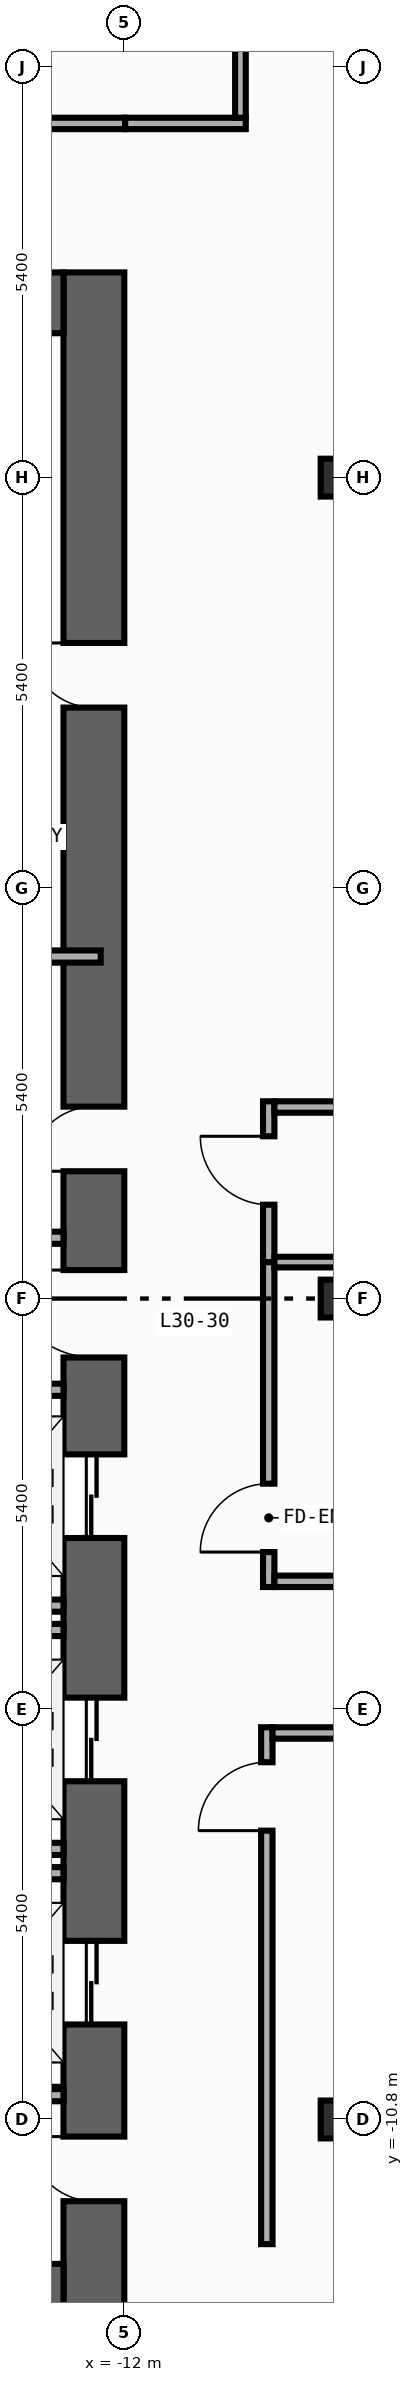
"""IFC4 building model, lengths in metres.
Left out: names, types, materials, properties, quantities, classifications, styles, units other than length and angle.
Written with IfcOpenShell. Run it as: python <this file> out.ifc"""

import sys

from ifc_helpers import new_model, si_unit, direction, frame, frame_2d, origin, origin_2d, place, context, subcontext, project, spatial, rectangle, i_section, extrude, element, fill, save


model = new_model("IFC4")
c1 = context("Model", 3, precision=1e-05, world=origin(), true_north=direction((0.0, 1.0)))
c2 = subcontext(c1, "Body", "Model", "MODEL_VIEW")
j1 = project(units=[si_unit("LENGTHUNIT", "METRE"), si_unit("PLANEANGLEUNIT", "RADIAN")], contexts=[c1])
p1 = place(None, origin())
s1 = spatial("IfcSite", under=j1, at=p1, CompositionType="ELEMENT")
p2 = place(p1, origin())
s2 = spatial("IfcBuilding", under=s1, at=p2, CompositionType="ELEMENT")
p3 = place(p2, frame((0.0, 0.0, 131.0)))
s3 = spatial("IfcBuildingStorey", under=s2, at=p3, CompositionType="ELEMENT", Elevation=131.0)
p4 = place(p3, frame((-12.4, -13.5, 0.0), z_axis=(0.0, 0.0, 1.0), x_axis=(0.0, 1.0, 0.0)))
e1 = element("IfcWall", 1, at=p4, inside=s3, PredefinedType="SHEAR", context=c2, shape_type="SweptSolid", body=[
    extrude(rectangle(XDim=27.0, YDim=0.8, at=frame_2d((13.5, 0.0))), origin(), (0.0, 0.0, 1.0), 3.94),
])
p5 = place(p4, frame((10.35, 0.0, 0.0)))
e2 = element("IfcOpeningElement", 2, at=p5, cuts=e1, PredefinedType="OPENING", context=c2, shape_type="SweptSolid", body=[
    extrude(rectangle(XDim=1.1, YDim=2.2, at=frame_2d((0.55, 1.1))), frame((0.0, 0.41, 0.0), z_axis=(0.0, -1.0, 0.0), x_axis=(1.0, 0.0, 0.0)), (0.0, 0.0, 1.0), 0.82),
])
p6 = place(p4, frame((7.15, 0.0, 0.0)))
e3 = element("IfcOpeningElement", 3, at=p6, cuts=e1, PredefinedType="OPENING", context=c2, shape_type="SweptSolid", body=[
    extrude(rectangle(XDim=1.1, YDim=2.2, at=frame_2d((0.55, 1.1))), frame((0.0, 0.41, 0.0), z_axis=(0.0, -1.0, 0.0), x_axis=(1.0, 0.0, 0.0)), (0.0, 0.0, 1.0), 0.82),
])
p7 = place(p4, frame((3.95, 0.0, 0.0)))
e4 = element("IfcOpeningElement", 4, at=p7, cuts=e1, PredefinedType="OPENING", context=c2, shape_type="SweptSolid", body=[
    extrude(rectangle(XDim=1.1, YDim=2.2, at=frame_2d((0.55, 1.1))), frame((0.0, 0.41, 0.0), z_axis=(0.0, -1.0, 0.0), x_axis=(1.0, 0.0, 0.0)), (0.0, 0.0, 1.0), 0.82),
])
p8 = place(p4, frame((15.175, 0.0, 0.0)))
e5 = element("IfcOpeningElement", 5, at=p8, cuts=e1, PredefinedType="OPENING", context=c2, shape_type="SweptSolid", body=[
    extrude(rectangle(XDim=0.85, YDim=2.1, at=frame_2d((0.425, 1.05))), frame((0.0, 0.41, 0.0), z_axis=(0.0, -1.0, 0.0), x_axis=(1.0, 0.0, 0.0)), (0.0, 0.0, 1.0), 0.82),
])
p9 = place(p4, frame((21.275, 0.0, 0.0)))
e6 = element("IfcOpeningElement", 6, at=p9, cuts=e1, PredefinedType="OPENING", context=c2, shape_type="SweptSolid", body=[
    extrude(rectangle(XDim=0.85, YDim=2.1, at=frame_2d((0.425, 1.05))), frame((0.0, 0.41, 0.0), z_axis=(0.0, -1.0, 0.0), x_axis=(1.0, 0.0, 0.0)), (0.0, 0.0, 1.0), 0.82),
])
p10 = place(p4, frame((12.725, 0.0, 0.0)))
e7 = element("IfcOpeningElement", 7, at=p10, cuts=e1, PredefinedType="OPENING", context=c2, shape_type="SweptSolid", body=[
    extrude(rectangle(XDim=1.15, YDim=2.2, at=frame_2d((0.575, 1.1))), frame((0.0, 0.41, 0.0), z_axis=(0.0, -1.0, 0.0), x_axis=(1.0, 0.0, 0.0)), (0.0, 0.0, 1.0), 0.82),
])
p11 = place(p4, frame((1.625, 0.0, 0.0)))
e8 = element("IfcOpeningElement", 8, at=p11, cuts=e1, PredefinedType="OPENING", context=c2, shape_type="SweptSolid", body=[
    extrude(rectangle(XDim=0.85, YDim=2.1, at=frame_2d((0.425, 1.05))), frame((0.0, 0.41, 0.0), z_axis=(0.0, -1.0, 0.0), x_axis=(1.0, 0.0, 0.0)), (0.0, 0.0, 1.0), 0.82),
])
for number, where, z_axis, x_axis in (
    (9, (-19.6, -13.1, 0.0), (0.0, 0.0, 1.0), (1.0, 0.0, 0.0)),
    (10, (-19.6, 13.1, 0.0), (0.0, 0.0, 1.0), (1.0, 0.0, 0.0)),
):
    element("IfcWall", number, at=place(p3, frame(where, z_axis=z_axis, x_axis=x_axis)), inside=s3, PredefinedType="SHEAR", context=c2, shape_type="SweptSolid", body=[
        extrude(rectangle(XDim=6.8, YDim=0.8, at=frame_2d((3.4, 0.0))), origin(), (0.0, 0.0, 1.0), 3.94),
    ])
for number, where, z_axis, x_axis in (
    (11, (-9.2, -10.8, 0.0), (0.0, 0.0, 1.0), (1.0, 0.0, 0.0)),
    (12, (-9.2, 0.0, 0.0), (0.0, 0.0, 1.0), (1.0, 0.0, 0.0)),
    (13, (-9.2, 10.8, 0.0), (0.0, 0.0, 1.0), (1.0, 0.0, 0.0)),
):
    element("IfcColumn", number, at=place(p3, frame(where, z_axis=z_axis, x_axis=x_axis)), inside=s3, PredefinedType="COLUMN", context=c2, shape_type="SweptSolid", body=[
        extrude(i_section(OverallWidth=0.432, OverallDepth=0.498, WebThickness=0.045, FlangeThickness=0.07, FilletRadius=0.022, at=origin_2d()), origin(), (0.0, 0.0, 1.0), 4.2),
    ])
for number, where, z_axis, x_axis in (
    (14, (-14.99, -4.04, 0.0), (0.0, 0.0, 1.0), (1.0, 0.0, 0.0)),
    (15, (-14.99, -7.24, 0.0), (0.0, 0.0, 1.0), (1.0, 0.0, 0.0)),
    (16, (-14.99, -4.36, 0.0), (0.0, 0.0, 1.0), (1.0, 0.0, 0.0)),
    (17, (-14.99, -7.56, 0.0), (0.0, 0.0, 1.0), (1.0, 0.0, 0.0)),
):
    element("IfcWall", number, at=place(p3, frame(where, z_axis=z_axis, x_axis=x_axis)), inside=s3, PredefinedType="STANDARD", context=c2, shape_type="SweptSolid", body=[
        extrude(rectangle(XDim=2.19, YDim=0.16, at=frame_2d((1.095, 0.0))), origin(), (0.0, 0.0, 1.0), 3.94),
    ])
for number, where, z_axis, x_axis in (
    (18, (-15.4, 0.8, 0.0), (0.0, 0.0, 1.0), (1.0, 0.0, 0.0)),
    (19, (-15.4, -1.2, 0.0), (0.0, 0.0, 1.0), (1.0, 0.0, 0.0)),
    (20, (-15.4, -10.48, 0.0), (0.0, 0.0, 1.0), (1.0, 0.0, 0.0)),
):
    element("IfcWall", number, at=place(p3, frame(where, z_axis=z_axis, x_axis=x_axis)), inside=s3, PredefinedType="STANDARD", context=c2, shape_type="SweptSolid", body=[
        extrude(rectangle(XDim=2.6, YDim=0.16, at=frame_2d((1.3, 0.0))), origin(), (0.0, 0.0, 1.0), 3.94),
    ])
p12 = place(p3, frame((-15.375, 4.5, 0.0), z_axis=(0.0, 0.0, 1.0), x_axis=(1.0, 0.0, 0.0)))
e21 = element("IfcWall", 21, at=p12, inside=s3, PredefinedType="PARTITIONING", context=c2, shape_type="SweptSolid", body=[
    extrude(rectangle(XDim=3.065, YDim=0.16, at=frame_2d((1.532, 0.0))), origin(), (0.0, 0.0, 1.0), 3.94),
])
p13 = place(p3, frame((-11.99, 15.46, 0.0), z_axis=(0.0, 0.0, 1.0), x_axis=(1.0, 0.0, 0.0)))
e22 = element("IfcWall", 22, at=p13, inside=s3, PredefinedType="PARTITIONING", context=c2, shape_type="SweptSolid", body=[
    extrude(rectangle(XDim=1.588, YDim=0.15, at=frame_2d((0.794, 0.0))), origin(), (0.0, 0.0, 1.0), 3.94),
])
p14 = place(p3, frame((-10.1, -3.795, 0.0), z_axis=(0.0, 0.0, 1.0), x_axis=(0.0, 1.0, 0.0)))
e23 = element("IfcWall", 23, at=p14, inside=s3, PredefinedType="PARTITIONING", context=c2, shape_type="SweptSolid", body=[
    extrude(rectangle(XDim=4.275, YDim=0.15, at=frame_2d((2.137, 0.0))), origin(), (0.0, 0.0, 1.0), 3.94),
])
p15 = place(p14, frame((0.46, 0.0, 0.0)))
e24 = element("IfcOpeningElement", 24, at=p15, cuts=e23, PredefinedType="OPENING", context=c2, shape_type="SweptSolid", body=[
    extrude(rectangle(XDim=0.9, YDim=2.15, at=frame_2d((0.45, 1.075))), frame((0.0, 0.085, 0.0), z_axis=(0.0, -1.0, 0.0), x_axis=(1.0, 0.0, 0.0)), (0.0, 0.0, 1.0), 0.17),
])
p16 = place(p3, frame((-10.1, 0.48, 0.0), z_axis=(0.0, 0.0, 1.0), x_axis=(0.0, 1.0, 0.0)))
e25 = element("IfcWall", 25, at=p16, inside=s3, PredefinedType="PARTITIONING", context=c2, shape_type="SweptSolid", body=[
    extrude(rectangle(XDim=2.115, YDim=0.15, at=frame_2d((1.058, 0.0))), origin(), (0.0, 0.0, 1.0), 3.94),
])
p17 = place(p16, frame((0.755, 0.0, 0.0)))
e26 = element("IfcOpeningElement", 26, at=p17, cuts=e25, PredefinedType="OPENING", context=c2, shape_type="SweptSolid", body=[
    extrude(rectangle(XDim=0.9, YDim=2.15, at=frame_2d((0.45, 1.075))), frame((0.0, 0.085, 0.0), z_axis=(0.0, -1.0, 0.0), x_axis=(1.0, 0.0, 0.0)), (0.0, 0.0, 1.0), 0.17),
])
p18 = place(p3, frame((-10.125, -12.44, 0.0), z_axis=(0.0, 0.0, 1.0), x_axis=(0.0, 1.0, 0.0)))
e27 = element("IfcWall", 27, at=p18, inside=s3, PredefinedType="PARTITIONING", context=c2, shape_type="SweptSolid", body=[
    extrude(rectangle(XDim=6.8, YDim=0.15, at=frame_2d((3.4, 0.0))), origin(), (0.0, 0.0, 1.0), 3.94),
])
p19 = place(p18, frame((5.44, 0.0, 0.0)))
e28 = element("IfcOpeningElement", 28, at=p19, cuts=e27, PredefinedType="OPENING", context=c2, shape_type="SweptSolid", body=[
    extrude(rectangle(XDim=0.9, YDim=2.15, at=frame_2d((0.45, 1.075))), frame((0.0, 0.085, 0.0), z_axis=(0.0, -1.0, 0.0), x_axis=(1.0, 0.0, 0.0)), (0.0, 0.0, 1.0), 0.17),
])
p20 = place(p3, frame((-10.025, 2.52, 0.0), z_axis=(0.0, 0.0, 1.0), x_axis=(1.0, 0.0, 0.0)))
e29 = element("IfcWall", 29, at=p20, inside=s3, PredefinedType="PARTITIONING", context=c2, shape_type="SweptSolid", body=[
    extrude(rectangle(XDim=14.22, YDim=0.15, at=frame_2d((7.11, 0.0))), origin(), (0.0, 0.0, 1.0), 3.94),
])
p21 = place(p20, frame((9.607, 0.0, 0.0)))
e30 = element("IfcOpeningElement", 30, at=p21, cuts=e29, PredefinedType="OPENING", context=c2, shape_type="SweptSolid", body=[
    extrude(rectangle(XDim=0.9, YDim=2.15, at=frame_2d((0.45, 1.075))), frame((0.0, 0.085, 0.0), z_axis=(0.0, -1.0, 0.0), x_axis=(1.0, 0.0, 0.0)), (0.0, 0.0, 1.0), 0.17),
])
p22 = place(p3, frame((-10.025, -3.72, 0.0), z_axis=(0.0, 0.0, 1.0), x_axis=(1.0, 0.0, 0.0)))
e31 = element("IfcWall", 31, at=p22, inside=s3, PredefinedType="PARTITIONING", context=c2, shape_type="SweptSolid", body=[
    extrude(rectangle(XDim=4.465, YDim=0.15, at=frame_2d((2.232, 0.0))), origin(), (0.0, 0.0, 1.0), 3.94),
])
p23 = place(p22, frame((3.105, 0.0, 0.0)))
e32 = element("IfcOpeningElement", 32, at=p23, cuts=e31, PredefinedType="OPENING", context=c2, shape_type="SweptSolid", body=[
    extrude(rectangle(XDim=0.9, YDim=2.15, at=frame_2d((0.45, 1.075))), frame((0.0, 0.085, 0.0), z_axis=(0.0, -1.0, 0.0), x_axis=(1.0, 0.0, 0.0)), (0.0, 0.0, 1.0), 0.17),
])
p24 = place(p3, frame((-10.05, -5.715, 0.0), z_axis=(0.0, 0.0, 1.0), x_axis=(1.0, 0.0, 0.0)))
e33 = element("IfcWall", 33, at=p24, inside=s3, PredefinedType="PARTITIONING", context=c2, shape_type="SweptSolid", body=[
    extrude(rectangle(XDim=8.265, YDim=0.15, at=frame_2d((4.133, 0.0))), origin(), (0.0, 0.0, 1.0), 3.94),
])
p25 = place(p24, frame((6.905, 0.0, 0.0)))
e34 = element("IfcOpeningElement", 34, at=p25, cuts=e33, PredefinedType="OPENING", context=c2, shape_type="SweptSolid", body=[
    extrude(rectangle(XDim=0.9, YDim=2.15, at=frame_2d((0.45, 1.075))), frame((0.0, 0.085, 0.0), z_axis=(0.0, -1.0, 0.0), x_axis=(1.0, 0.0, 0.0)), (0.0, 0.0, 1.0), 0.17),
])
p26 = place(p3, frame((-20.64, 15.46, 0.0), z_axis=(0.0, 0.0, 1.0), x_axis=(1.0, 0.0, 0.0)))
e35 = element("IfcWall", 35, at=p26, inside=s3, PredefinedType="PARTITIONING", context=c2, shape_type="SweptSolid", body=[
    extrude(rectangle(XDim=8.65, YDim=0.15, at=frame_2d((4.325, 0.0))), origin(), (0.0, 0.0, 1.0), 3.94),
])
p27 = place(p26, frame((2.871, 0.0, 0.0)))
e36 = element("IfcOpeningElement", 36, at=p27, cuts=e35, PredefinedType="OPENING", context=c2, shape_type="SweptSolid", body=[
    extrude(rectangle(XDim=0.9, YDim=2.15, at=frame_2d((0.45, 1.075))), frame((0.0, 0.085, 0.0), z_axis=(0.0, -1.0, 0.0), x_axis=(1.0, 0.0, 0.0)), (0.0, 0.0, 1.0), 0.17),
])
p28 = place(p3, frame((-10.472, 15.535, 0.0), z_axis=(0.0, 0.0, 1.0), x_axis=(0.0, 1.0, 0.0)))
e37 = element("IfcWall", 37, at=p28, inside=s3, PredefinedType="PARTITIONING", context=c2, shape_type="SweptSolid", body=[
    extrude(rectangle(XDim=10.62, YDim=0.14, at=frame_2d((5.31, 0.0))), origin(), (0.0, 0.0, 1.0), 3.94),
])
p29 = place(p28, frame((6.695, 0.0, 0.0)))
e38 = element("IfcOpeningElement", 38, at=p29, cuts=e37, PredefinedType="OPENING", context=c2, shape_type="SweptSolid", body=[
    extrude(rectangle(XDim=0.85, YDim=2.1, at=frame_2d((0.425, 1.05))), frame((0.0, 0.08, 0.0), z_axis=(0.0, -1.0, 0.0), x_axis=(1.0, 0.0, 0.0)), (0.0, 0.0, 1.0), 0.16),
])
p30 = place(p3, frame((-10.025, 0.48, 0.0), z_axis=(0.0, 0.0, 1.0), x_axis=(1.0, 0.0, 0.0)))
e39 = element("IfcWall", 39, at=p30, inside=s3, PredefinedType="PARTITIONING", context=c2, shape_type="SweptSolid", body=[
    extrude(rectangle(XDim=4.465, YDim=0.14, at=frame_2d((2.232, 0.0))), origin(), (0.0, 0.0, 1.0), 3.94),
])
p31 = place(p5, origin())
e40 = element("IfcDoor", 40, at=p31, inside=s3, OperationType="DOUBLE_DOOR_SLIDING", PredefinedType="DOOR", context=c2, shape_type="SweptSolid", body=[
    extrude(rectangle(XDim=1.1, YDim=2.2, at=frame_2d((0.55, 1.1))), frame((0.0, 0.025, 0.0), z_axis=(0.0, -1.0, 0.0), x_axis=(1.0, 0.0, 0.0)), (0.0, 0.0, 1.0), 0.05),
])
fill(e2, e40)
p32 = place(p6, origin())
e41 = element("IfcDoor", 41, at=p32, inside=s3, OperationType="DOUBLE_DOOR_SLIDING", PredefinedType="DOOR", context=c2, shape_type="SweptSolid", body=[
    extrude(rectangle(XDim=1.1, YDim=2.2, at=frame_2d((0.55, 1.1))), frame((0.0, 0.025, 0.0), z_axis=(0.0, -1.0, 0.0), x_axis=(1.0, 0.0, 0.0)), (0.0, 0.0, 1.0), 0.05),
])
fill(e3, e41)
p33 = place(p7, origin())
e42 = element("IfcDoor", 42, at=p33, inside=s3, OperationType="DOUBLE_DOOR_SLIDING", PredefinedType="DOOR", context=c2, shape_type="SweptSolid", body=[
    extrude(rectangle(XDim=1.1, YDim=2.2, at=frame_2d((0.55, 1.1))), frame((0.0, 0.025, 0.0), z_axis=(0.0, -1.0, 0.0), x_axis=(1.0, 0.0, 0.0)), (0.0, 0.0, 1.0), 0.05),
])
fill(e4, e42)
p34 = place(p8, origin())
e43 = element("IfcDoor", 43, at=p34, inside=s3, OperationType="SINGLE_SWING_LEFT", PredefinedType="DOOR", context=c2, shape_type="SweptSolid", body=[
    extrude(rectangle(XDim=0.85, YDim=2.1, at=frame_2d((0.425, 1.05))), frame((0.0, 0.025, 0.0), z_axis=(0.0, -1.0, 0.0), x_axis=(1.0, 0.0, 0.0)), (0.0, 0.0, 1.0), 0.05),
])
fill(e5, e43)
p35 = place(p9, origin())
e44 = element("IfcDoor", 44, at=p35, inside=s3, OperationType="SINGLE_SWING_RIGHT", PredefinedType="DOOR", context=c2, shape_type="SweptSolid", body=[
    extrude(rectangle(XDim=0.85, YDim=2.1, at=frame_2d((0.425, 1.05))), frame((0.0, 0.025, 0.0), z_axis=(0.0, -1.0, 0.0), x_axis=(1.0, 0.0, 0.0)), (0.0, 0.0, 1.0), 0.05),
])
fill(e6, e44)
p36 = place(p10, origin())
e45 = element("IfcDoor", 45, at=p36, inside=s3, OperationType="SINGLE_SWING_RIGHT", PredefinedType="DOOR", context=c2, shape_type="SweptSolid", body=[
    extrude(rectangle(XDim=1.15, YDim=2.2, at=frame_2d((0.575, 1.1))), frame((0.0, 0.025, 0.0), z_axis=(0.0, -1.0, 0.0), x_axis=(1.0, 0.0, 0.0)), (0.0, 0.0, 1.0), 0.05),
])
fill(e7, e45)
p37 = place(p11, origin())
e46 = element("IfcDoor", 46, at=p37, inside=s3, OperationType="SINGLE_SWING_RIGHT", PredefinedType="DOOR", context=c2, shape_type="SweptSolid", body=[
    extrude(rectangle(XDim=0.85, YDim=2.1, at=frame_2d((0.425, 1.05))), frame((0.0, 0.025, 0.0), z_axis=(0.0, -1.0, 0.0), x_axis=(1.0, 0.0, 0.0)), (0.0, 0.0, 1.0), 0.05),
])
fill(e8, e46)
p38 = place(p15, origin())
e47 = element("IfcDoor", 47, at=p38, inside=s3, OperationType="SINGLE_SWING_LEFT", PredefinedType="DOOR", context=c2, shape_type="SweptSolid", body=[
    extrude(rectangle(XDim=0.9, YDim=2.15, at=frame_2d((0.45, 1.075))), frame((0.0, 0.025, 0.0), z_axis=(0.0, -1.0, 0.0), x_axis=(1.0, 0.0, 0.0)), (0.0, 0.0, 1.0), 0.05),
])
fill(e24, e47)
p39 = place(p17, origin())
e48 = element("IfcDoor", 48, at=p39, inside=s3, OperationType="SINGLE_SWING_RIGHT", PredefinedType="DOOR", context=c2, shape_type="SweptSolid", body=[
    extrude(rectangle(XDim=0.9, YDim=2.15, at=frame_2d((0.45, 1.075))), frame((0.0, 0.025, 0.0), z_axis=(0.0, -1.0, 0.0), x_axis=(1.0, 0.0, 0.0)), (0.0, 0.0, 1.0), 0.05),
])
fill(e26, e48)
p40 = place(p19, origin())
e49 = element("IfcDoor", 49, at=p40, inside=s3, OperationType="SINGLE_SWING_LEFT", PredefinedType="DOOR", context=c2, shape_type="SweptSolid", body=[
    extrude(rectangle(XDim=0.9, YDim=2.15, at=frame_2d((0.45, 1.075))), frame((0.0, 0.025, 0.0), z_axis=(0.0, -1.0, 0.0), x_axis=(1.0, 0.0, 0.0)), (0.0, 0.0, 1.0), 0.05),
])
fill(e28, e49)
save(model, sys.argv[1])
